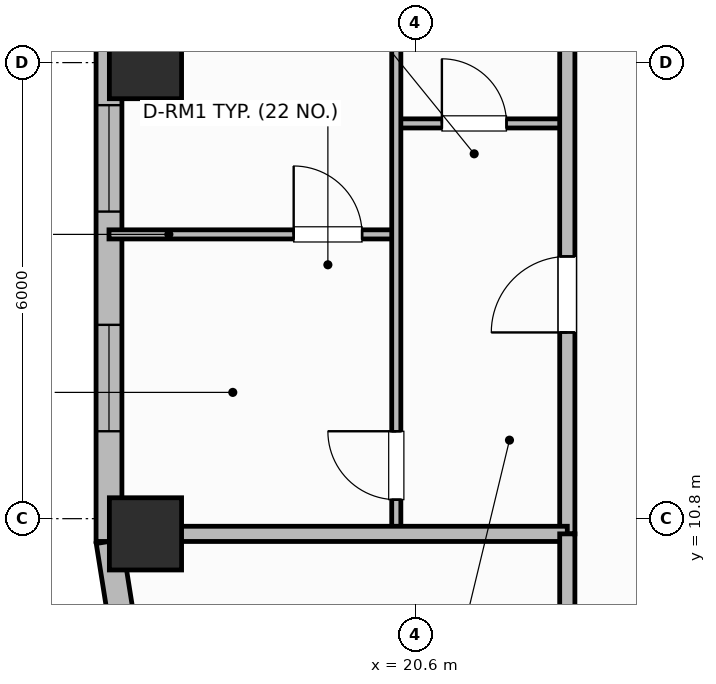
"""IFC4 building model, lengths in metres.
Left out: names, types, materials, properties, quantities, classifications, styles, units other than length and angle.
Written with IfcOpenShell. Run it as: python <this file> out.ifc"""

import sys

from ifc_helpers import new_model, si_unit, direction, frame, frame_2d, origin, origin_2d, place, context, subcontext, project, spatial, rectangle, extrude, element, fill, save


model = new_model("IFC4")
c1 = context("Model", 3, precision=1e-05, world=origin(), true_north=direction((0.0, 1.0)))
c2 = subcontext(c1, "Body", "Model", "MODEL_VIEW")
j1 = project(units=[si_unit("LENGTHUNIT", "METRE"), si_unit("PLANEANGLEUNIT", "RADIAN")], contexts=[c1])
p1 = place(None, origin())
s1 = spatial("IfcSite", under=j1, at=p1, CompositionType="ELEMENT")
p2 = place(p1, origin())
s2 = spatial("IfcBuilding", under=s1, at=p2, CompositionType="ELEMENT")
p3 = place(p2, frame((0.0, 0.0, 151.5)))
s3 = spatial("IfcBuildingStorey", under=s2, at=p3, CompositionType="ELEMENT", Elevation=151.5)
for number, where, z_axis, x_axis in (
    (1, (17.05, 10.6, 0.0), (0.0, 0.0, 1.0), (1.0, 0.0, 0.0)),
    (2, (17.05, 16.8, 0.0), (0.0, 0.0, 1.0), (1.0, 0.0, 0.0)),
):
    element("IfcColumn", number, at=place(p3, frame(where, z_axis=z_axis, x_axis=x_axis)), inside=s3, PredefinedType="COLUMN", context=c2, shape_type="SweptSolid", body=[
        extrude(rectangle(XDim=0.95, YDim=0.95, at=origin_2d()), origin(), (0.0, 0.0, 1.0), 3.7),
    ])
p4 = place(p3, frame((16.57, 10.5, 0.0), z_axis=(0.0, 0.0, 1.0), x_axis=(0.156514556949, -0.987675651954, 0.0)))
e3 = element("IfcWall", 3, at=p4, inside=s3, PredefinedType="SOLIDWALL", context=c2, shape_type="SweptSolid", body=[
    extrude(rectangle(XDim=1.135, YDim=0.34, at=frame_2d((0.568, 0.0))), origin(), (0.0, 0.0, 1.0), 2.72),
])
p5 = place(p3, frame((16.57, 23.8, 0.0), z_axis=(0.0, 0.0, 1.0), x_axis=(0.0, -1.0, 0.0)))
e4 = element("IfcWall", 4, at=p5, inside=s3, PredefinedType="SOLIDWALL", context=c2, shape_type="SweptSolid", body=[
    extrude(rectangle(XDim=13.3, YDim=0.34, at=frame_2d((6.65, 0.0))), origin(), (0.0, 0.0, 1.0), 2.72),
])
p6 = place(p5, frame((2.1, 0.0, 0.0)))
e5 = element("IfcOpeningElement", 5, at=p6, cuts=e4, PredefinedType="OPENING", context=c2, shape_type="SweptSolid", body=[
    extrude(rectangle(XDim=1.6, YDim=2.1, at=frame_2d((0.8, 1.05))), frame((0.0, 0.18, 0.0), z_axis=(0.0, -1.0, 0.0), x_axis=(1.0, 0.0, 0.0)), (0.0, 0.0, 1.0), 0.36),
])
p7 = place(p5, frame((7.56, 0.0, 0.71)))
e6 = element("IfcOpeningElement", 6, at=p7, cuts=e4, PredefinedType="OPENING", context=c2, shape_type="SweptSolid", body=[
    extrude(rectangle(XDim=1.4, YDim=1.85, at=frame_2d((0.7, 0.925))), frame((0.0, 0.18, 0.0), z_axis=(0.0, -1.0, 0.0), x_axis=(1.0, 0.0, 0.0)), (0.0, 0.0, 1.0), 0.36),
])
p8 = place(p5, frame((10.45, 0.0, 0.75)))
e7 = element("IfcOpeningElement", 7, at=p8, cuts=e4, PredefinedType="OPENING", context=c2, shape_type="SweptSolid", body=[
    extrude(rectangle(XDim=1.4, YDim=1.85, at=frame_2d((0.7, 0.925))), frame((0.0, 0.18, 0.0), z_axis=(0.0, -1.0, 0.0), x_axis=(1.0, 0.0, 0.0)), (0.0, 0.0, 1.0), 0.36),
])
p9 = place(p3, frame((20.35, 16.0, 0.0), z_axis=(0.0, 0.0, 1.0), x_axis=(1.0, 0.0, 0.0)))
e8 = element("IfcWall", 8, at=p9, inside=s3, PredefinedType="PARTITIONING", context=c2, shape_type="SweptSolid", body=[
    extrude(rectangle(XDim=2.25, YDim=0.12, at=frame_2d((1.125, 0.0))), origin(), (0.0, 0.0, 1.0), 2.55),
])
p10 = place(p9, frame((0.6, 0.0, 0.0)))
e9 = element("IfcOpeningElement", 9, at=p10, cuts=e8, PredefinedType="OPENING", context=c2, shape_type="SweptSolid", body=[
    extrude(rectangle(XDim=0.85, YDim=2.1, at=frame_2d((0.425, 1.05))), frame((0.0, 0.07, 0.0), z_axis=(0.0, -1.0, 0.0), x_axis=(1.0, 0.0, 0.0)), (0.0, 0.0, 1.0), 0.14),
])
p11 = place(p3, frame((16.57, 14.54, 0.0), z_axis=(0.0, 0.0, 1.0), x_axis=(1.0, 0.0, 0.0)))
e10 = element("IfcWall", 10, at=p11, inside=s3, PredefinedType="PARTITIONING", context=c2, shape_type="SweptSolid", body=[
    extrude(rectangle(XDim=3.78, YDim=0.12, at=frame_2d((1.89, 0.0))), origin(), (0.0, 0.0, 1.0), 2.55),
])
p12 = place(p11, frame((2.43, 0.0, 0.0)))
e11 = element("IfcOpeningElement", 11, at=p12, cuts=e10, PredefinedType="OPENING", context=c2, shape_type="SweptSolid", body=[
    extrude(rectangle(XDim=0.9, YDim=2.1, at=frame_2d((0.45, 1.05))), frame((0.0, 0.07, 0.0), z_axis=(0.0, -1.0, 0.0), x_axis=(1.0, 0.0, 0.0)), (0.0, 0.0, 1.0), 0.14),
])
p13 = place(p3, frame((20.35, 10.64, 0.0), z_axis=(0.0, 0.0, 1.0), x_axis=(0.0, 1.0, 0.0)))
e12 = element("IfcWall", 12, at=p13, inside=s3, PredefinedType="PARTITIONING", context=c2, shape_type="SweptSolid", body=[
    extrude(rectangle(XDim=15.92, YDim=0.12, at=frame_2d((7.96, 0.0))), origin(), (0.0, 0.0, 1.0), 2.55),
])
p14 = place(p13, frame((0.41, 0.0, 0.0)))
e13 = element("IfcOpeningElement", 13, at=p14, cuts=e12, PredefinedType="OPENING", context=c2, shape_type="SweptSolid", body=[
    extrude(rectangle(XDim=0.9, YDim=2.1, at=frame_2d((0.45, 1.05))), frame((0.0, 0.07, 0.0), z_axis=(0.0, -1.0, 0.0), x_axis=(1.0, 0.0, 0.0)), (0.0, 0.0, 1.0), 0.14),
])
p15 = place(p13, frame((13.125, 0.0, 0.0)))
e14 = element("IfcOpeningElement", 14, at=p15, cuts=e12, PredefinedType="OPENING", context=c2, shape_type="SweptSolid", body=[
    extrude(rectangle(XDim=0.82, YDim=2.08, at=frame_2d((0.41, 1.04))), frame((0.0, 0.07, 0.0), z_axis=(0.0, -1.0, 0.0), x_axis=(1.0, 0.0, 0.0)), (0.0, 0.0, 1.0), 0.14),
])
p16 = place(p3, frame((22.6, 10.6, 0.0), z_axis=(0.0, 0.0, 1.0), x_axis=(0.0, 1.0, 0.0)))
e15 = element("IfcWall", 15, at=p16, inside=s3, PredefinedType="PARTITIONING", context=c2, shape_type="SweptSolid", body=[
    extrude(rectangle(XDim=35.2, YDim=0.2, at=frame_2d((17.6, 0.0))), origin(), (0.0, 0.0, 1.0), 2.55),
])
p17 = place(p16, frame((2.65, 0.0, 0.0)))
e16 = element("IfcOpeningElement", 16, at=p17, cuts=e15, PredefinedType="OPENING", context=c2, shape_type="SweptSolid", body=[
    extrude(rectangle(XDim=1.0, YDim=2.15, at=frame_2d((0.5, 1.075))), frame((0.0, 0.11, 0.0), z_axis=(0.0, -1.0, 0.0), x_axis=(1.0, 0.0, 0.0)), (0.0, 0.0, 1.0), 0.22),
])
p18 = place(p16, frame((19.95, 0.0, 0.0)))
e17 = element("IfcOpeningElement", 17, at=p18, cuts=e15, PredefinedType="OPENING", context=c2, shape_type="SweptSolid", body=[
    extrude(rectangle(XDim=1.0, YDim=2.15, at=frame_2d((0.5, 1.075))), frame((0.0, 0.11, 0.0), z_axis=(0.0, -1.0, 0.0), x_axis=(1.0, 0.0, 0.0)), (0.0, 0.0, 1.0), 0.22),
])
p19 = place(p3, frame((16.99, 10.6, 0.0), z_axis=(0.0, 0.0, 1.0), x_axis=(1.0, 0.0, 0.0)))
e18 = element("IfcWall", 18, at=p19, inside=s3, PredefinedType="PARTITIONING", context=c2, shape_type="SweptSolid", body=[
    extrude(rectangle(XDim=5.61, YDim=0.2, at=frame_2d((2.805, 0.0))), origin(), (0.0, 0.0, 1.0), 2.55),
])
p20 = place(p3, frame((22.6, 6.87, 0.0), z_axis=(0.0, 0.0, 1.0), x_axis=(0.0, 1.0, 0.0)))
e19 = element("IfcWall", 19, at=p20, inside=s3, PredefinedType="PARTITIONING", context=c2, shape_type="SweptSolid", body=[
    extrude(rectangle(XDim=3.73, YDim=0.2, at=frame_2d((1.865, 0.0))), origin(), (0.0, 0.0, 1.0), 2.55),
])
p21 = place(p7, origin())
e20 = element("IfcWindow", 20, at=p21, inside=s3, PartitioningType="SINGLE_PANEL", PredefinedType="WINDOW", context=c2, shape_type="SweptSolid", body=[
    extrude(rectangle(XDim=1.4, YDim=1.85, at=frame_2d((0.7, 0.925))), frame((0.0, 0.03, 0.0), z_axis=(0.0, -1.0, 0.0), x_axis=(1.0, 0.0, 0.0)), (0.0, 0.0, 1.0), 0.06),
])
fill(e6, e20)
p22 = place(p8, origin())
e21 = element("IfcWindow", 21, at=p22, inside=s3, PartitioningType="SINGLE_PANEL", PredefinedType="WINDOW", context=c2, shape_type="SweptSolid", body=[
    extrude(rectangle(XDim=1.4, YDim=1.85, at=frame_2d((0.7, 0.925))), frame((0.0, 0.03, 0.0), z_axis=(0.0, -1.0, 0.0), x_axis=(1.0, 0.0, 0.0)), (0.0, 0.0, 1.0), 0.06),
])
fill(e7, e21)
p23 = place(p10, origin())
e22 = element("IfcDoor", 22, at=p23, inside=s3, OperationType="SINGLE_SWING_LEFT", PredefinedType="DOOR", context=c2, shape_type="SweptSolid", body=[
    extrude(rectangle(XDim=0.85, YDim=2.1, at=frame_2d((0.425, 1.05))), frame((0.0, 0.025, 0.0), z_axis=(0.0, -1.0, 0.0), x_axis=(1.0, 0.0, 0.0)), (0.0, 0.0, 1.0), 0.05),
])
fill(e9, e22)
p24 = place(p12, origin())
e23 = element("IfcDoor", 23, at=p24, inside=s3, OperationType="SINGLE_SWING_LEFT", PredefinedType="DOOR", context=c2, shape_type="SweptSolid", body=[
    extrude(rectangle(XDim=0.9, YDim=2.1, at=frame_2d((0.45, 1.05))), frame((0.0, 0.025, 0.0), z_axis=(0.0, -1.0, 0.0), x_axis=(1.0, 0.0, 0.0)), (0.0, 0.0, 1.0), 0.05),
])
fill(e11, e23)
p25 = place(p14, origin())
e24 = element("IfcDoor", 24, at=p25, inside=s3, OperationType="SINGLE_SWING_RIGHT", PredefinedType="DOOR", context=c2, shape_type="SweptSolid", body=[
    extrude(rectangle(XDim=0.9, YDim=2.1, at=frame_2d((0.45, 1.05))), frame((0.0, 0.025, 0.0), z_axis=(0.0, -1.0, 0.0), x_axis=(1.0, 0.0, 0.0)), (0.0, 0.0, 1.0), 0.05),
])
fill(e13, e24)
p26 = place(p17, origin())
e25 = element("IfcDoor", 25, at=p26, inside=s3, OperationType="SINGLE_SWING_LEFT", PredefinedType="DOOR", context=c2, shape_type="SweptSolid", body=[
    extrude(rectangle(XDim=1.0, YDim=2.15, at=frame_2d((0.5, 1.075))), frame((0.0, 0.025, 0.0), z_axis=(0.0, -1.0, 0.0), x_axis=(1.0, 0.0, 0.0)), (0.0, 0.0, 1.0), 0.05),
])
fill(e16, e25)
save(model, sys.argv[1])
